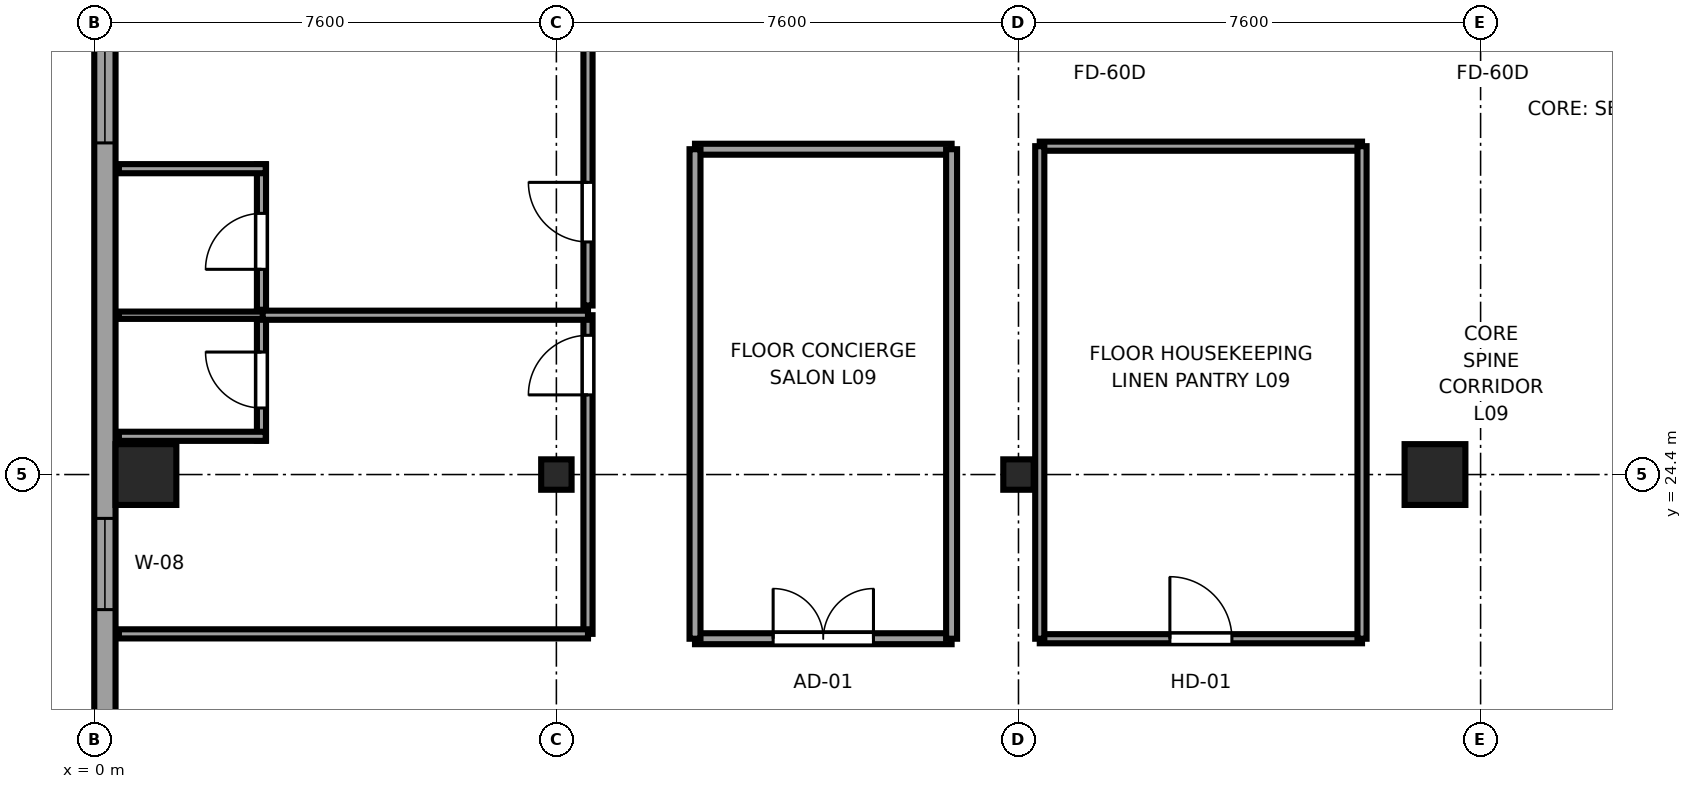
"""IFC4 building model, lengths in metres.
Left out: names, types, materials, properties, quantities, classifications, styles, units other than length and angle.
Written with IfcOpenShell. Run it as: python <this file> out.ifc"""

import sys

from ifc_helpers import new_model, si_unit, direction, frame, frame_2d, origin, origin_2d, place, context, subcontext, project, spatial, rectangle, i_section, extrude, source, transform, mapped, element, fill, save


model = new_model("IFC4")
c1 = context("Model", 3, precision=1e-05, world=origin(), true_north=direction((0.0, 1.0)))
c2 = subcontext(c1, "Body", "Model", "MODEL_VIEW")
j1 = project(units=[si_unit("LENGTHUNIT", "METRE"), si_unit("PLANEANGLEUNIT", "RADIAN")], contexts=[c1])
p1 = place(None, origin())
s1 = spatial("IfcSite", under=j1, at=p1, CompositionType="ELEMENT")
p2 = place(p1, origin())
s2 = spatial("IfcBuilding", under=s1, at=p2, CompositionType="ELEMENT")
p3 = place(p2, frame((0.0, 0.0, 42.65)))
s3 = spatial("IfcBuildingStorey", under=s2, at=p3, CompositionType="ELEMENT", Elevation=42.65)
m1 = source(origin(), c2, "Body", "SweptSolid", [
    extrude(rectangle(XDim=1.0, YDim=1.0, at=origin_2d()), origin(), (0.0, 0.0, 1.0), 3.55),
])
p4 = place(p3, frame((0.85, 24.4, 0.0), z_axis=(0.0, 0.0, 1.0), x_axis=(1.0, 0.0, 0.0)))
e1 = element("IfcColumn", 1, at=p4, inside=s3, PredefinedType="COLUMN", context=c2, shape_type="MappedRepresentation", body=[
    mapped(m1, transform((0.0, 0.0, 0.0), x_axis=(1.0, 0.0, 0.0), y_axis=(0.0, 1.0, 0.0), z_axis=(0.0, 0.0, 1.0), scale=1.0)),
])
m2 = source(origin(), c2, "Body", "SweptSolid", [
    extrude(i_section(OverallWidth=0.5, OverallDepth=0.5, WebThickness=0.028, FlangeThickness=0.045, at=origin_2d()), origin(), (0.0, 0.0, 1.0), 3.55),
])
for number, where, z_axis, x_axis in (
    (2, (7.6, 24.4, 0.0), (0.0, 0.0, 1.0), (1.0, 0.0, 0.0)),
    (3, (15.2, 24.4, 0.0), (0.0, 0.0, 1.0), (1.0, 0.0, 0.0)),
):
    element("IfcColumn", number, at=place(p3, frame(where, z_axis=z_axis, x_axis=x_axis)), inside=s3, PredefinedType="COLUMN", context=c2, shape_type="MappedRepresentation", body=[
        mapped(m2, transform((0.0, 0.0, 0.0), x_axis=(1.0, 0.0, 0.0), y_axis=(0.0, 1.0, 0.0), z_axis=(0.0, 0.0, 1.0), scale=1.0)),
    ])
p5 = place(p3, frame((22.05, 24.4, 0.0), z_axis=(0.0, 0.0, 1.0), x_axis=(1.0, 0.0, 0.0)))
e4 = element("IfcColumn", 4, at=p5, inside=s3, PredefinedType="COLUMN", context=c2, shape_type="MappedRepresentation", body=[
    mapped(m1, transform((0.0, 0.0, 0.0), x_axis=(1.0, 0.0, 0.0), y_axis=(0.0, 1.0, 0.0), z_axis=(0.0, 0.0, 1.0), scale=1.0)),
])
p6 = place(p3, frame((0.175, 41.383, 0.0), z_axis=(0.0, 0.0, 1.0), x_axis=(0.0, -1.0, 0.0)))
e5 = element("IfcWall", 5, at=p6, inside=s3, PredefinedType="SOLIDWALL", context=c2, shape_type="SweptSolid", body=[
    extrude(rectangle(XDim=36.766, YDim=0.35, at=frame_2d((18.383, 0.0))), origin(), (0.0, 0.0, 1.0), 3.37),
])
p7 = place(p6, frame((1.526, 0.0, 0.68)))
e6 = element("IfcOpeningElement", 6, at=p7, cuts=e5, PredefinedType="OPENING", context=c2, shape_type="SweptSolid", body=[
    extrude(rectangle(XDim=2.1, YDim=1.9, at=frame_2d((1.05, 0.95))), frame((0.0, 0.185, 0.0), z_axis=(0.0, -1.0, 0.0), x_axis=(1.0, 0.0, 0.0)), (0.0, 0.0, 1.0), 0.37),
])
p8 = place(p6, frame((4.428, 0.0, 0.68)))
e7 = element("IfcOpeningElement", 7, at=p8, cuts=e5, PredefinedType="OPENING", context=c2, shape_type="SweptSolid", body=[
    extrude(rectangle(XDim=2.1, YDim=1.9, at=frame_2d((1.05, 0.95))), frame((0.0, 0.185, 0.0), z_axis=(0.0, -1.0, 0.0), x_axis=(1.0, 0.0, 0.0)), (0.0, 0.0, 1.0), 0.37),
])
p9 = place(p6, frame((9.429, 0.0, 0.68)))
e8 = element("IfcOpeningElement", 8, at=p9, cuts=e5, PredefinedType="OPENING", context=c2, shape_type="SweptSolid", body=[
    extrude(rectangle(XDim=2.1, YDim=1.9, at=frame_2d((1.05, 0.95))), frame((0.0, 0.185, 0.0), z_axis=(0.0, -1.0, 0.0), x_axis=(1.0, 0.0, 0.0)), (0.0, 0.0, 1.0), 0.37),
])
p10 = place(p6, frame((22.335, 0.0, 0.68)))
e9 = element("IfcOpeningElement", 9, at=p10, cuts=e5, PredefinedType="OPENING", context=c2, shape_type="SweptSolid", body=[
    extrude(rectangle(XDim=2.1, YDim=1.9, at=frame_2d((1.05, 0.95))), frame((0.0, 0.185, 0.0), z_axis=(0.0, -1.0, 0.0), x_axis=(1.0, 0.0, 0.0)), (0.0, 0.0, 1.0), 0.37),
])
p11 = place(p6, frame((29.188, 0.0, 0.68)))
e10 = element("IfcOpeningElement", 10, at=p11, cuts=e5, PredefinedType="OPENING", context=c2, shape_type="SweptSolid", body=[
    extrude(rectangle(XDim=2.1, YDim=1.9, at=frame_2d((1.05, 0.95))), frame((0.0, 0.185, 0.0), z_axis=(0.0, -1.0, 0.0), x_axis=(1.0, 0.0, 0.0)), (0.0, 0.0, 1.0), 0.37),
])
p12 = place(p6, frame((34.879, 0.0, 0.62)))
e11 = element("IfcOpeningElement", 11, at=p12, cuts=e5, PredefinedType="OPENING", context=c2, shape_type="SweptSolid", body=[
    extrude(rectangle(XDim=1.5, YDim=1.55, at=frame_2d((0.75, 0.775))), frame((0.0, 0.185, 0.0), z_axis=(0.0, -1.0, 0.0), x_axis=(1.0, 0.0, 0.0)), (0.0, 0.0, 1.0), 0.37),
])
p13 = place(p6, frame((17.704, 0.0, 0.62)))
e12 = element("IfcOpeningElement", 12, at=p13, cuts=e5, PredefinedType="OPENING", context=c2, shape_type="SweptSolid", body=[
    extrude(rectangle(XDim=1.5, YDim=1.55, at=frame_2d((0.75, 0.775))), frame((0.0, 0.185, 0.0), z_axis=(0.0, -1.0, 0.0), x_axis=(1.0, 0.0, 0.0)), (0.0, 0.0, 1.0), 0.37),
])
p14 = place(p3, frame((2.75, 24.959, 0.0), z_axis=(0.0, 0.0, 1.0), x_axis=(0.0, 1.0, 0.0)))
e13 = element("IfcWall", 13, at=p14, inside=s3, PredefinedType="PARTITIONING", context=c2, shape_type="SweptSolid", body=[
    extrude(rectangle(XDim=2.131, YDim=0.15, at=frame_2d((1.065, 0.0))), origin(), (0.0, 0.0, 1.0), 3.37),
])
p15 = place(p14, frame((0.535, 0.0, 0.0)))
e14 = element("IfcOpeningElement", 14, at=p15, cuts=e13, PredefinedType="OPENING", context=c2, shape_type="SweptSolid", body=[
    extrude(rectangle(XDim=0.92, YDim=2.01, at=frame_2d((0.46, 1.005))), frame((0.0, 0.085, 0.0), z_axis=(0.0, -1.0, 0.0), x_axis=(1.0, 0.0, 0.0)), (0.0, 0.0, 1.0), 0.17),
])
p16 = place(p3, frame((0.405, 25.029, 0.0), z_axis=(0.0, 0.0, 1.0), x_axis=(1.0, 0.0, 0.0)))
e15 = element("IfcWall", 15, at=p16, inside=s3, PredefinedType="PARTITIONING", context=c2, shape_type="SweptSolid", body=[
    extrude(rectangle(XDim=2.415, YDim=0.15, at=frame_2d((1.208, 0.0))), origin(), (0.0, 0.0, 1.0), 3.37),
])
p17 = place(p3, frame((0.405, 27.02, 0.0), z_axis=(0.0, 0.0, 1.0), x_axis=(1.0, 0.0, 0.0)))
e16 = element("IfcWall", 16, at=p17, inside=s3, PredefinedType="PLUMBINGWALL", context=c2, shape_type="SweptSolid", body=[
    extrude(rectangle(XDim=2.415, YDim=0.12, at=frame_2d((1.208, 0.0))), origin(), (0.0, 0.0, 1.0), 3.37),
])
p18 = place(p3, frame((2.75, 27.11, 0.0), z_axis=(0.0, 0.0, 1.0), x_axis=(0.0, 1.0, 0.0)))
e17 = element("IfcWall", 17, at=p18, inside=s3, PredefinedType="PARTITIONING", context=c2, shape_type="SweptSolid", body=[
    extrude(rectangle(XDim=2.39, YDim=0.15, at=frame_2d((1.195, 0.0))), origin(), (0.0, 0.0, 1.0), 3.37),
])
p19 = place(p18, frame((0.665, 0.0, 0.0)))
e18 = element("IfcOpeningElement", 18, at=p19, cuts=e17, PredefinedType="OPENING", context=c2, shape_type="SweptSolid", body=[
    extrude(rectangle(XDim=0.92, YDim=2.01, at=frame_2d((0.46, 1.005))), frame((0.0, 0.085, 0.0), z_axis=(0.0, -1.0, 0.0), x_axis=(1.0, 0.0, 0.0)), (0.0, 0.0, 1.0), 0.17),
])
p20 = place(p3, frame((0.405, 29.43, 0.0), z_axis=(0.0, 0.0, 1.0), x_axis=(1.0, 0.0, 0.0)))
e19 = element("IfcWall", 19, at=p20, inside=s3, PredefinedType="PARTITIONING", context=c2, shape_type="SweptSolid", body=[
    extrude(rectangle(XDim=2.415, YDim=0.15, at=frame_2d((1.208, 0.0))), origin(), (0.0, 0.0, 1.0), 3.37),
])
p21 = place(p3, frame((8.12, 21.78, 0.0), z_axis=(0.0, 0.0, 1.0), x_axis=(0.0, 1.0, 0.0)))
e20 = element("IfcWall", 20, at=p21, inside=s3, PredefinedType="PARTITIONING", context=c2, shape_type="SweptSolid", body=[
    extrude(rectangle(XDim=5.24, YDim=0.15, at=frame_2d((2.62, 0.0))), origin(), (0.0, 0.0, 1.0), 3.37),
])
p22 = place(p21, frame((3.93, 0.0, 0.0)))
e21 = element("IfcOpeningElement", 21, at=p22, cuts=e20, PredefinedType="OPENING", context=c2, shape_type="SweptSolid", body=[
    extrude(rectangle(XDim=0.98, YDim=2.12, at=frame_2d((0.49, 1.06))), frame((0.0, 0.085, 0.0), z_axis=(0.0, -1.0, 0.0), x_axis=(1.0, 0.0, 0.0)), (0.0, 0.0, 1.0), 0.17),
])
p23 = place(p3, frame((0.405, 21.78, 0.0), z_axis=(0.0, 0.0, 1.0), x_axis=(1.0, 0.0, 0.0)))
e22 = element("IfcWall", 22, at=p23, inside=s3, PredefinedType="PARTITIONING", context=c2, shape_type="SweptSolid", body=[
    extrude(rectangle(XDim=7.715, YDim=0.15, at=frame_2d((3.857, 0.0))), origin(), (0.0, 0.0, 1.0), 3.37),
])
p24 = place(p3, frame((2.77, 27.02, 0.0), z_axis=(0.0, 0.0, 1.0), x_axis=(1.0, 0.0, 0.0)))
e23 = element("IfcWall", 23, at=p24, inside=s3, PredefinedType="PARTITIONING", context=c2, shape_type="SweptSolid", body=[
    extrude(rectangle(XDim=5.35, YDim=0.15, at=frame_2d((2.675, 0.0))), origin(), (0.0, 0.0, 1.0), 3.37),
])
p25 = place(p3, frame((8.12, 27.18, 0.0), z_axis=(0.0, 0.0, 1.0), x_axis=(0.0, 1.0, 0.0)))
e24 = element("IfcWall", 24, at=p25, inside=s3, PredefinedType="PARTITIONING", context=c2, shape_type="SweptSolid", body=[
    extrude(rectangle(XDim=18.415, YDim=0.15, at=frame_2d((9.208, 0.0))), origin(), (0.0, 0.0, 1.0), 3.37),
])
p26 = place(p25, frame((1.045, 0.0, 0.0)))
e25 = element("IfcOpeningElement", 25, at=p26, cuts=e24, PredefinedType="OPENING", context=c2, shape_type="SweptSolid", body=[
    extrude(rectangle(XDim=0.98, YDim=2.12, at=frame_2d((0.49, 1.06))), frame((0.0, 0.085, 0.0), z_axis=(0.0, -1.0, 0.0), x_axis=(1.0, 0.0, 0.0)), (0.0, 0.0, 1.0), 0.17),
])
p27 = place(p3, frame((9.88, 21.7, 0.0), z_axis=(0.0, 0.0, 1.0), x_axis=(1.0, 0.0, 0.0)))
e26 = element("IfcWall", 26, at=p27, inside=s3, PredefinedType="PARTITIONING", context=c2, shape_type="SweptSolid", body=[
    extrude(rectangle(XDim=4.22, YDim=0.18, at=frame_2d((2.11, 0.0))), origin(), (0.0, 0.0, 1.0), 3.37),
])
p28 = place(p27, frame((1.285, 0.0, 0.0)))
e27 = element("IfcOpeningElement", 27, at=p28, cuts=e26, PredefinedType="OPENING", context=c2, shape_type="SweptSolid", body=[
    extrude(rectangle(XDim=1.65, YDim=2.15, at=frame_2d((0.825, 1.075))), frame((0.0, 0.1, 0.0), z_axis=(0.0, -1.0, 0.0), x_axis=(1.0, 0.0, 0.0)), (0.0, 0.0, 1.0), 0.2),
])
p29 = place(p3, frame((9.88, 29.75, 0.0), z_axis=(0.0, 0.0, 1.0), x_axis=(1.0, 0.0, 0.0)))
e28 = element("IfcWall", 28, at=p29, inside=s3, PredefinedType="PARTITIONING", context=c2, shape_type="SweptSolid", body=[
    extrude(rectangle(XDim=4.22, YDim=0.18, at=frame_2d((2.11, 0.0))), origin(), (0.0, 0.0, 1.0), 3.37),
])
for number, where, z_axis, x_axis in (
    (29, (9.88, 21.7, 0.0), (0.0, 0.0, 1.0), (0.0, 1.0, 0.0)),
    (30, (14.1, 21.7, 0.0), (0.0, 0.0, 1.0), (0.0, 1.0, 0.0)),
):
    element("IfcWall", number, at=place(p3, frame(where, z_axis=z_axis, x_axis=x_axis)), inside=s3, PredefinedType="PARTITIONING", context=c2, shape_type="SweptSolid", body=[
        extrude(rectangle(XDim=8.05, YDim=0.18, at=frame_2d((4.025, 0.0))), origin(), (0.0, 0.0, 1.0), 3.37),
    ])
p30 = place(p3, frame((15.55, 21.7, 0.0), z_axis=(0.0, 0.0, 1.0), x_axis=(1.0, 0.0, 0.0)))
e31 = element("IfcWall", 31, at=p30, inside=s3, PredefinedType="PARTITIONING", context=c2, shape_type="SweptSolid", body=[
    extrude(rectangle(XDim=5.3, YDim=0.15, at=frame_2d((2.65, 0.0))), origin(), (0.0, 0.0, 1.0), 3.37),
])
p31 = place(p30, frame((2.14, 0.0, 0.0)))
e32 = element("IfcOpeningElement", 32, at=p31, cuts=e31, PredefinedType="OPENING", context=c2, shape_type="SweptSolid", body=[
    extrude(rectangle(XDim=1.02, YDim=2.03, at=frame_2d((0.51, 1.015))), frame((0.0, 0.085, 0.0), z_axis=(0.0, -1.0, 0.0), x_axis=(1.0, 0.0, 0.0)), (0.0, 0.0, 1.0), 0.17),
])
p32 = place(p3, frame((15.55, 29.8, 0.0), z_axis=(0.0, 0.0, 1.0), x_axis=(1.0, 0.0, 0.0)))
e33 = element("IfcWall", 33, at=p32, inside=s3, PredefinedType="PARTITIONING", context=c2, shape_type="SweptSolid", body=[
    extrude(rectangle(XDim=5.3, YDim=0.15, at=frame_2d((2.65, 0.0))), origin(), (0.0, 0.0, 1.0), 3.37),
])
for number, where, z_axis, x_axis in (
    (34, (15.55, 21.7, 0.0), (0.0, 0.0, 1.0), (0.0, 1.0, 0.0)),
    (35, (20.85, 21.7, 0.0), (0.0, 0.0, 1.0), (0.0, 1.0, 0.0)),
):
    element("IfcWall", number, at=place(p3, frame(where, z_axis=z_axis, x_axis=x_axis)), inside=s3, PredefinedType="PARTITIONING", context=c2, shape_type="SweptSolid", body=[
        extrude(rectangle(XDim=8.1, YDim=0.15, at=frame_2d((4.05, 0.0))), origin(), (0.0, 0.0, 1.0), 3.37),
    ])
m3 = source(origin(), c2, "Body", "SweptSolid", [
    extrude(rectangle(XDim=2.1, YDim=1.9, at=frame_2d((1.05, 0.95))), frame((0.0, 0.09, 0.0), z_axis=(0.0, -1.0, 0.0), x_axis=(1.0, 0.0, 0.0)), (0.0, 0.0, 1.0), 0.06),
])
p33 = place(p9, origin())
e36 = element("IfcWindow", 36, at=p33, inside=s3, PartitioningType="TRIPLE_PANEL_HORIZONTAL", PredefinedType="WINDOW", context=c2, shape_type="MappedRepresentation", body=[
    mapped(m3, transform((0.0, 0.0, 0.0), x_axis=(1.0, 0.0, 0.0), y_axis=(0.0, 1.0, 0.0), z_axis=(0.0, 0.0, 1.0), scale=1.0)),
])
fill(e8, e36)
m4 = source(origin(), c2, "Body", "SweptSolid", [
    extrude(rectangle(XDim=1.5, YDim=1.55, at=frame_2d((0.75, 0.775))), frame((0.0, 0.09, 0.0), z_axis=(0.0, -1.0, 0.0), x_axis=(1.0, 0.0, 0.0)), (0.0, 0.0, 1.0), 0.06),
])
p34 = place(p13, origin())
e37 = element("IfcWindow", 37, at=p34, inside=s3, PartitioningType="SINGLE_PANEL", PredefinedType="WINDOW", context=c2, shape_type="MappedRepresentation", body=[
    mapped(m4, transform((0.0, 0.0, 0.0), x_axis=(1.0, 0.0, 0.0), y_axis=(0.0, 1.0, 0.0), z_axis=(0.0, 0.0, 1.0), scale=1.0)),
])
fill(e12, e37)
m5 = source(origin(), c2, "Body", "SweptSolid", [
    extrude(rectangle(XDim=0.92, YDim=2.01, at=frame_2d((0.46, 1.005))), frame((0.0, 0.025, 0.0), z_axis=(0.0, -1.0, 0.0), x_axis=(1.0, 0.0, 0.0)), (0.0, 0.0, 1.0), 0.05),
])
p35 = place(p15, origin())
e38 = element("IfcDoor", 38, at=p35, inside=s3, OperationType="SINGLE_SWING_RIGHT", PredefinedType="DOOR", context=c2, shape_type="MappedRepresentation", body=[
    mapped(m5, transform((0.0, 0.0, 0.0), x_axis=(1.0, 0.0, 0.0), y_axis=(0.0, 1.0, 0.0), z_axis=(0.0, 0.0, 1.0), scale=1.0)),
])
fill(e14, e38)
p36 = place(p19, origin())
e39 = element("IfcDoor", 39, at=p36, inside=s3, OperationType="SINGLE_SWING_LEFT", PredefinedType="DOOR", context=c2, shape_type="MappedRepresentation", body=[
    mapped(m5, transform((0.0, 0.0, 0.0), x_axis=(1.0, 0.0, 0.0), y_axis=(0.0, 1.0, 0.0), z_axis=(0.0, 0.0, 1.0), scale=1.0)),
])
fill(e18, e39)
m6 = source(origin(), c2, "Body", "SweptSolid", [
    extrude(rectangle(XDim=0.98, YDim=2.12, at=frame_2d((0.49, 1.06))), frame((0.0, 0.025, 0.0), z_axis=(0.0, -1.0, 0.0), x_axis=(1.0, 0.0, 0.0)), (0.0, 0.0, 1.0), 0.05),
])
p37 = place(p22, origin())
e40 = element("IfcDoor", 40, at=p37, inside=s3, OperationType="SINGLE_SWING_LEFT", PredefinedType="DOOR", context=c2, shape_type="MappedRepresentation", body=[
    mapped(m6, transform((0.0, 0.0, 0.0), x_axis=(1.0, 0.0, 0.0), y_axis=(0.0, 1.0, 0.0), z_axis=(0.0, 0.0, 1.0), scale=1.0)),
])
fill(e21, e40)
p38 = place(p26, origin())
e41 = element("IfcDoor", 41, at=p38, inside=s3, OperationType="SINGLE_SWING_RIGHT", PredefinedType="DOOR", context=c2, shape_type="MappedRepresentation", body=[
    mapped(m6, transform((0.0, 0.0, 0.0), x_axis=(1.0, 0.0, 0.0), y_axis=(0.0, 1.0, 0.0), z_axis=(0.0, 0.0, 1.0), scale=1.0)),
])
fill(e25, e41)
m7 = source(origin(), c2, "Body", "SweptSolid", [
    extrude(rectangle(XDim=1.65, YDim=2.15, at=frame_2d((0.825, 1.075))), frame((0.0, 0.025, 0.0), z_axis=(0.0, -1.0, 0.0), x_axis=(1.0, 0.0, 0.0)), (0.0, 0.0, 1.0), 0.05),
])
p39 = place(p28, origin())
e42 = element("IfcDoor", 42, at=p39, inside=s3, OperationType="DOUBLE_DOOR_SINGLE_SWING", PredefinedType="DOOR", context=c2, shape_type="MappedRepresentation", body=[
    mapped(m7, transform((0.0, 0.0, 0.0), x_axis=(1.0, 0.0, 0.0), y_axis=(0.0, 1.0, 0.0), z_axis=(0.0, 0.0, 1.0), scale=1.0)),
])
fill(e27, e42)
m8 = source(origin(), c2, "Body", "SweptSolid", [
    extrude(rectangle(XDim=1.02, YDim=2.03, at=frame_2d((0.51, 1.015))), frame((0.0, 0.025, 0.0), z_axis=(0.0, -1.0, 0.0), x_axis=(1.0, 0.0, 0.0)), (0.0, 0.0, 1.0), 0.05),
])
p40 = place(p31, origin())
e43 = element("IfcDoor", 43, at=p40, inside=s3, OperationType="SINGLE_SWING_LEFT", PredefinedType="DOOR", context=c2, shape_type="MappedRepresentation", body=[
    mapped(m8, transform((0.0, 0.0, 0.0), x_axis=(1.0, 0.0, 0.0), y_axis=(0.0, 1.0, 0.0), z_axis=(0.0, 0.0, 1.0), scale=1.0)),
])
fill(e32, e43)
save(model, sys.argv[1])
